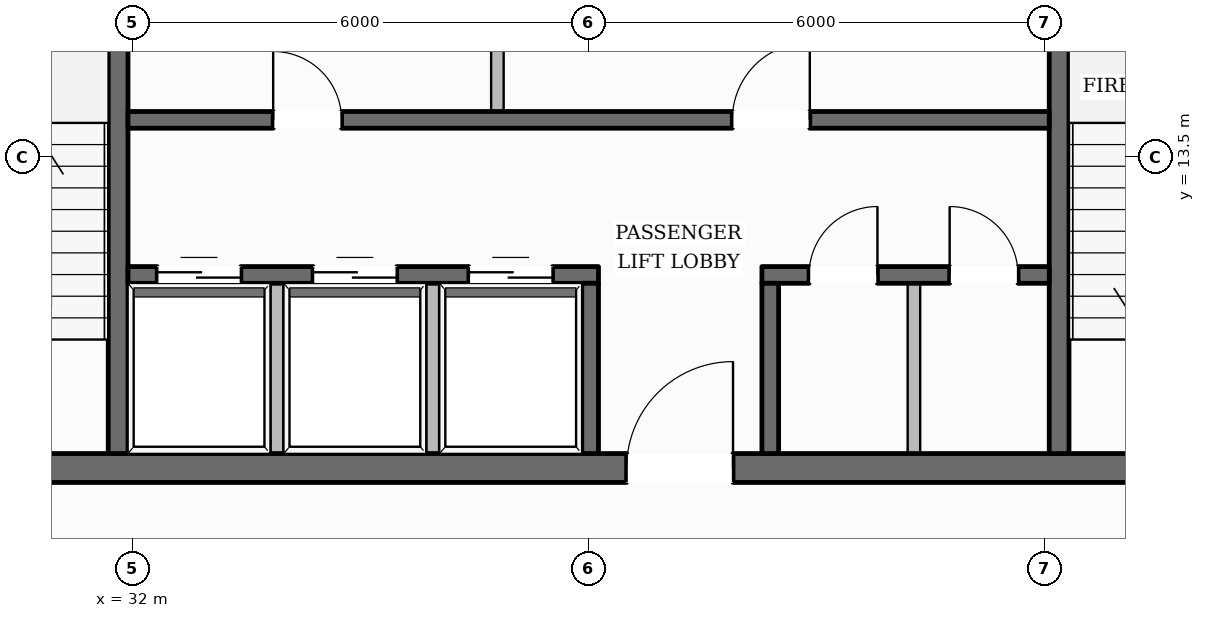
"""IFC4 building model, lengths in metres.
Left out: names, types, materials, properties, quantities, classifications, styles, units other than length and angle.
Written with IfcOpenShell. Run it as: python <this file> out.ifc"""

import sys

from ifc_helpers import new_model, si_unit, direction, frame, frame_2d, origin, place, context, subcontext, project, spatial, rectangle, extrude, element, fill, save


model = new_model("IFC4")
c1 = context("Model", 3, precision=1e-05, world=origin(), true_north=direction((0.0, 1.0)))
c2 = subcontext(c1, "Body", "Model", "MODEL_VIEW")
j1 = project(units=[si_unit("LENGTHUNIT", "METRE"), si_unit("PLANEANGLEUNIT", "RADIAN")], contexts=[c1])
p1 = place(None, origin())
s1 = spatial("IfcSite", under=j1, at=p1, CompositionType="ELEMENT")
p2 = place(p1, origin())
s2 = spatial("IfcBuilding", under=s1, at=p2, CompositionType="ELEMENT")
p3 = place(p2, frame((0.0, 0.0, 251.05)))
s3 = spatial("IfcBuildingStorey", under=s2, at=p3, CompositionType="ELEMENT", Elevation=251.05)
p4 = place(p3, frame((28.1, 9.41, 0.0), z_axis=(0.0, 0.0, 1.0), x_axis=(1.0, 0.0, 0.0)))
e1 = element("IfcWall", 1, at=p4, inside=s3, PredefinedType="SOLIDWALL", context=c2, shape_type="SweptSolid", body=[
    extrude(rectangle(XDim=19.8, YDim=0.38, at=frame_2d((9.9, 0.0))), origin(), (0.0, 0.0, 1.0), 3.61),
])
p5 = place(p4, frame((10.4, 0.0, 0.0)))
e2 = element("IfcOpeningElement", 2, at=p5, cuts=e1, PredefinedType="OPENING", context=c2, shape_type="SweptSolid", body=[
    extrude(rectangle(XDim=1.4, YDim=2.2, at=frame_2d((0.7, 1.1))), frame((0.0, 0.2, 0.0), z_axis=(0.0, -1.0, 0.0), x_axis=(1.0, 0.0, 0.0)), (0.0, 0.0, 1.0), 0.4),
])
p6 = place(p3, frame((31.81, 9.6, 0.0), z_axis=(0.0, 0.0, 1.0), x_axis=(0.0, 1.0, 0.0)))
e3 = element("IfcWall", 3, at=p6, inside=s3, PredefinedType="SHEAR", context=c2, shape_type="SweptSolid", body=[
    extrude(rectangle(XDim=13.0, YDim=0.26, at=frame_2d((6.5, 0.0))), origin(), (0.0, 0.0, 1.0), 3.61),
])
p7 = place(p6, frame((10.925, 0.0, 0.0)))
e4 = element("IfcOpeningElement", 4, at=p7, cuts=e3, PredefinedType="OPENING", context=c2, shape_type="SweptSolid", body=[
    extrude(rectangle(XDim=1.25, YDim=2.25, at=frame_2d((0.625, 1.125))), frame((0.0, 0.14, 0.0), z_axis=(0.0, -1.0, 0.0), x_axis=(1.0, 0.0, 0.0)), (0.0, 0.0, 1.0), 0.28),
])
p8 = place(p3, frame((44.19, 9.6, 0.0), z_axis=(0.0, 0.0, 1.0), x_axis=(0.0, 1.0, 0.0)))
e5 = element("IfcWall", 5, at=p8, inside=s3, PredefinedType="SHEAR", context=c2, shape_type="SweptSolid", body=[
    extrude(rectangle(XDim=13.0, YDim=0.26, at=frame_2d((6.5, 0.0))), origin(), (0.0, 0.0, 1.0), 3.61),
])
p9 = place(p8, frame((10.925, 0.0, 0.0)))
e6 = element("IfcOpeningElement", 6, at=p9, cuts=e5, PredefinedType="OPENING", context=c2, shape_type="SweptSolid", body=[
    extrude(rectangle(XDim=1.25, YDim=2.25, at=frame_2d((0.625, 1.125))), frame((0.0, 0.14, 0.0), z_axis=(0.0, -1.0, 0.0), x_axis=(1.0, 0.0, 0.0)), (0.0, 0.0, 1.0), 0.28),
])
p10 = place(p3, frame((31.94, 13.99, 0.0), z_axis=(0.0, 0.0, 1.0), x_axis=(1.0, 0.0, 0.0)))
e7 = element("IfcWall", 7, at=p10, inside=s3, PredefinedType="SOLIDWALL", context=c2, shape_type="SweptSolid", body=[
    extrude(rectangle(XDim=12.12, YDim=0.22, at=frame_2d((6.06, 0.0))), origin(), (0.0, 0.0, 1.0), 3.61),
])
p11 = place(p10, frame((1.91, 0.0, 0.0)))
e8 = element("IfcOpeningElement", 8, at=p11, cuts=e7, PredefinedType="OPENING", context=c2, shape_type="SweptSolid", body=[
    extrude(rectangle(XDim=0.9, YDim=2.1, at=frame_2d((0.45, 1.05))), frame((0.0, 0.12, 0.0), z_axis=(0.0, -1.0, 0.0), x_axis=(1.0, 0.0, 0.0)), (0.0, 0.0, 1.0), 0.24),
])
p12 = place(p10, frame((7.95, 0.0, 0.0)))
e9 = element("IfcOpeningElement", 9, at=p12, cuts=e7, PredefinedType="OPENING", context=c2, shape_type="SweptSolid", body=[
    extrude(rectangle(XDim=1.02, YDim=2.15, at=frame_2d((0.51, 1.075))), frame((0.0, 0.12, 0.0), z_axis=(0.0, -1.0, 0.0), x_axis=(1.0, 0.0, 0.0)), (0.0, 0.0, 1.0), 0.24),
])
p13 = place(p3, frame((31.94, 11.95, 0.0), z_axis=(0.0, 0.0, 1.0), x_axis=(1.0, 0.0, 0.0)))
e10 = element("IfcWall", 10, at=p13, inside=s3, PredefinedType="SOLIDWALL", context=c2, shape_type="SweptSolid", body=[
    extrude(rectangle(XDim=6.19, YDim=0.22, at=frame_2d((3.095, 0.0))), origin(), (0.0, 0.0, 1.0), 3.61),
])
p14 = place(p13, frame((0.385, 0.0, 0.0)))
e11 = element("IfcOpeningElement", 11, at=p14, cuts=e10, PredefinedType="OPENING", context=c2, shape_type="SweptSolid", body=[
    extrude(rectangle(XDim=1.1, YDim=2.2, at=frame_2d((0.55, 1.1))), frame((0.0, 0.12, 0.0), z_axis=(0.0, -1.0, 0.0), x_axis=(1.0, 0.0, 0.0)), (0.0, 0.0, 1.0), 0.24),
])
p15 = place(p13, frame((2.435, 0.0, 0.0)))
e12 = element("IfcOpeningElement", 12, at=p15, cuts=e10, PredefinedType="OPENING", context=c2, shape_type="SweptSolid", body=[
    extrude(rectangle(XDim=1.1, YDim=2.2, at=frame_2d((0.55, 1.1))), frame((0.0, 0.12, 0.0), z_axis=(0.0, -1.0, 0.0), x_axis=(1.0, 0.0, 0.0)), (0.0, 0.0, 1.0), 0.24),
])
p16 = place(p13, frame((4.485, 0.0, 0.0)))
e13 = element("IfcOpeningElement", 13, at=p16, cuts=e10, PredefinedType="OPENING", context=c2, shape_type="SweptSolid", body=[
    extrude(rectangle(XDim=1.1, YDim=2.2, at=frame_2d((0.55, 1.1))), frame((0.0, 0.12, 0.0), z_axis=(0.0, -1.0, 0.0), x_axis=(1.0, 0.0, 0.0)), (0.0, 0.0, 1.0), 0.24),
])
p17 = place(p3, frame((40.28, 11.95, 0.0), z_axis=(0.0, 0.0, 1.0), x_axis=(1.0, 0.0, 0.0)))
e14 = element("IfcWall", 14, at=p17, inside=s3, PredefinedType="SOLIDWALL", context=c2, shape_type="SweptSolid", body=[
    extrude(rectangle(XDim=3.78, YDim=0.22, at=frame_2d((1.89, 0.0))), origin(), (0.0, 0.0, 1.0), 3.61),
])
p18 = place(p17, frame((0.62, 0.0, 0.0)))
e15 = element("IfcOpeningElement", 15, at=p18, cuts=e14, PredefinedType="OPENING", context=c2, shape_type="SweptSolid", body=[
    extrude(rectangle(XDim=0.9, YDim=2.1, at=frame_2d((0.45, 1.05))), frame((0.0, 0.12, 0.0), z_axis=(0.0, -1.0, 0.0), x_axis=(1.0, 0.0, 0.0)), (0.0, 0.0, 1.0), 0.24),
])
p19 = place(p17, frame((2.47, 0.0, 0.0)))
e16 = element("IfcOpeningElement", 16, at=p19, cuts=e14, PredefinedType="OPENING", context=c2, shape_type="SweptSolid", body=[
    extrude(rectangle(XDim=0.9, YDim=2.1, at=frame_2d((0.45, 1.05))), frame((0.0, 0.12, 0.0), z_axis=(0.0, -1.0, 0.0), x_axis=(1.0, 0.0, 0.0)), (0.0, 0.0, 1.0), 0.24),
])
for number, where, z_axis, x_axis in (
    (17, (38.02, 9.6, 0.0), (0.0, 0.0, 1.0), (0.0, 1.0, 0.0)),
    (18, (40.39, 9.6, 0.0), (0.0, 0.0, 1.0), (0.0, 1.0, 0.0)),
):
    element("IfcWall", number, at=place(p3, frame(where, z_axis=z_axis, x_axis=x_axis)), inside=s3, PredefinedType="SOLIDWALL", context=c2, shape_type="SweptSolid", body=[
        extrude(rectangle(XDim=2.24, YDim=0.22, at=frame_2d((1.12, 0.0))), origin(), (0.0, 0.0, 1.0), 3.61),
    ])
p20 = place(p3, frame((16.214, 11.135, 0.0), z_axis=(0.0, 0.0, 1.0), x_axis=(0.49510347201, 0.868834018673, 0.0)))
e19 = element("IfcWall", 19, at=p20, inside=s3, PredefinedType="STANDARD", context=c2, shape_type="SweptSolid", body=[
    extrude(rectangle(XDim=37.643, YDim=0.35, at=frame_2d((18.822, 0.0))), origin(), (0.0, 0.0, 1.0), 3.196),
])
p21 = place(p20, frame((33.429, 0.0, 0.65)))
e20 = element("IfcOpeningElement", 20, at=p21, cuts=e19, PredefinedType="OPENING", context=c2, shape_type="SweptSolid", body=[
    extrude(rectangle(XDim=1.35, YDim=1.75, at=frame_2d((0.675, 0.875))), frame((0.0, 0.185, 0.0), z_axis=(0.0, -1.0, 0.0), x_axis=(1.0, 0.0, 0.0)), (0.0, 0.0, 1.0), 0.37),
])
p22 = place(p20, frame((27.315, 0.0, 0.65)))
e21 = element("IfcOpeningElement", 21, at=p22, cuts=e19, PredefinedType="OPENING", context=c2, shape_type="SweptSolid", body=[
    extrude(rectangle(XDim=1.35, YDim=1.75, at=frame_2d((0.675, 0.875))), frame((0.0, 0.185, 0.0), z_axis=(0.0, -1.0, 0.0), x_axis=(1.0, 0.0, 0.0)), (0.0, 0.0, 1.0), 0.37),
])
p23 = place(p20, frame((15.087, 0.0, 0.65)))
e22 = element("IfcOpeningElement", 22, at=p23, cuts=e19, PredefinedType="OPENING", context=c2, shape_type="SweptSolid", body=[
    extrude(rectangle(XDim=1.35, YDim=1.75, at=frame_2d((0.675, 0.875))), frame((0.0, 0.185, 0.0), z_axis=(0.0, -1.0, 0.0), x_axis=(1.0, 0.0, 0.0)), (0.0, 0.0, 1.0), 0.37),
])
p24 = place(p20, frame((8.973, 0.0, 0.65)))
e23 = element("IfcOpeningElement", 23, at=p24, cuts=e19, PredefinedType="OPENING", context=c2, shape_type="SweptSolid", body=[
    extrude(rectangle(XDim=1.35, YDim=1.75, at=frame_2d((0.675, 0.875))), frame((0.0, 0.185, 0.0), z_axis=(0.0, -1.0, 0.0), x_axis=(1.0, 0.0, 0.0)), (0.0, 0.0, 1.0), 0.37),
])
p25 = place(p20, frame((2.859, 0.0, 0.65)))
e24 = element("IfcOpeningElement", 24, at=p25, cuts=e19, PredefinedType="OPENING", context=c2, shape_type="SweptSolid", body=[
    extrude(rectangle(XDim=1.35, YDim=1.75, at=frame_2d((0.675, 0.875))), frame((0.0, 0.185, 0.0), z_axis=(0.0, -1.0, 0.0), x_axis=(1.0, 0.0, 0.0)), (0.0, 0.0, 1.0), 0.37),
])
p26 = place(p3, frame((41.284, 43.76, 0.0), z_axis=(0.0, 0.0, 1.0), x_axis=(0.50479404613, -0.863239810824, 0.0)))
e25 = element("IfcWall", 25, at=p26, inside=s3, PredefinedType="STANDARD", context=c2, shape_type="SweptSolid", body=[
    extrude(rectangle(XDim=38.372, YDim=0.35, at=frame_2d((19.186, 0.0))), origin(), (0.0, 0.0, 1.0), 3.196),
])
p27 = place(p26, frame((34.102, 0.0, 0.65)))
e26 = element("IfcOpeningElement", 26, at=p27, cuts=e25, PredefinedType="OPENING", context=c2, shape_type="SweptSolid", body=[
    extrude(rectangle(XDim=1.35, YDim=1.75, at=frame_2d((0.675, 0.875))), frame((0.0, 0.185, 0.0), z_axis=(0.0, -1.0, 0.0), x_axis=(1.0, 0.0, 0.0)), (0.0, 0.0, 1.0), 0.37),
])
p28 = place(p26, frame((27.864, 0.0, 0.65)))
e27 = element("IfcOpeningElement", 27, at=p28, cuts=e25, PredefinedType="OPENING", context=c2, shape_type="SweptSolid", body=[
    extrude(rectangle(XDim=1.35, YDim=1.75, at=frame_2d((0.675, 0.875))), frame((0.0, 0.185, 0.0), z_axis=(0.0, -1.0, 0.0), x_axis=(1.0, 0.0, 0.0)), (0.0, 0.0, 1.0), 0.37),
])
p29 = place(p26, frame((15.39, 0.0, 0.65)))
e28 = element("IfcOpeningElement", 28, at=p29, cuts=e25, PredefinedType="OPENING", context=c2, shape_type="SweptSolid", body=[
    extrude(rectangle(XDim=1.35, YDim=1.75, at=frame_2d((0.675, 0.875))), frame((0.0, 0.185, 0.0), z_axis=(0.0, -1.0, 0.0), x_axis=(1.0, 0.0, 0.0)), (0.0, 0.0, 1.0), 0.37),
])
p30 = place(p26, frame((9.153, 0.0, 0.65)))
e29 = element("IfcOpeningElement", 29, at=p30, cuts=e25, PredefinedType="OPENING", context=c2, shape_type="SweptSolid", body=[
    extrude(rectangle(XDim=1.35, YDim=1.75, at=frame_2d((0.675, 0.875))), frame((0.0, 0.185, 0.0), z_axis=(0.0, -1.0, 0.0), x_axis=(1.0, 0.0, 0.0)), (0.0, 0.0, 1.0), 0.37),
])
p31 = place(p26, frame((2.915, 0.0, 0.65)))
e30 = element("IfcOpeningElement", 30, at=p31, cuts=e25, PredefinedType="OPENING", context=c2, shape_type="SweptSolid", body=[
    extrude(rectangle(XDim=1.35, YDim=1.75, at=frame_2d((0.675, 0.875))), frame((0.0, 0.185, 0.0), z_axis=(0.0, -1.0, 0.0), x_axis=(1.0, 0.0, 0.0)), (0.0, 0.0, 1.0), 0.37),
])
for number, where, z_axis, x_axis in (
    (31, (33.9, 9.49, 0.0), (0.0, 0.0, 1.0), (0.0, 1.0, 0.0)),
    (32, (35.95, 9.49, 0.0), (0.0, 0.0, 1.0), (0.0, 1.0, 0.0)),
):
    element("IfcWall", number, at=place(p3, frame(where, z_axis=z_axis, x_axis=x_axis)), inside=s3, PredefinedType="PARTITIONING", context=c2, shape_type="SweptSolid", body=[
        extrude(rectangle(XDim=2.35, YDim=0.165, at=frame_2d((1.175, 0.0))), origin(), (0.0, 0.0, 1.0), 3.61),
    ])
p32 = place(p3, frame((36.8, 14.1, 0.0), z_axis=(0.0, 0.0, 1.0), x_axis=(0.0, 1.0, 0.0)))
e33 = element("IfcWall", 33, at=p32, inside=s3, PredefinedType="PARTITIONING", context=c2, shape_type="SweptSolid", body=[
    extrude(rectangle(XDim=2.24, YDim=0.165, at=frame_2d((1.12, 0.0))), origin(), (0.0, 0.0, 1.0), 3.61),
])
p33 = place(p3, frame((42.28, 9.49, 0.0), z_axis=(0.0, 0.0, 1.0), x_axis=(0.0, 1.0, 0.0)))
e34 = element("IfcWall", 34, at=p33, inside=s3, PredefinedType="PARTITIONING", context=c2, shape_type="SweptSolid", body=[
    extrude(rectangle(XDim=2.35, YDim=0.165, at=frame_2d((1.175, 0.0))), origin(), (0.0, 0.0, 1.0), 3.61),
])
p34 = place(p5, origin())
e35 = element("IfcDoor", 35, at=p34, inside=s3, OperationType="SINGLE_SWING_RIGHT", PredefinedType="DOOR", context=c2, shape_type="SweptSolid", body=[
    extrude(rectangle(XDim=1.4, YDim=2.2, at=frame_2d((0.7, 1.1))), frame((0.0, 0.025, 0.0), z_axis=(0.0, -1.0, 0.0), x_axis=(1.0, 0.0, 0.0)), (0.0, 0.0, 1.0), 0.05),
])
fill(e2, e35)
p35 = place(p14, origin())
e36 = element("IfcDoor", 36, at=p35, inside=s3, OperationType="DOUBLE_DOOR_SLIDING", PredefinedType="DOOR", context=c2, shape_type="SweptSolid", body=[
    extrude(rectangle(XDim=1.1, YDim=2.2, at=frame_2d((0.55, 1.1))), frame((0.0, 0.025, 0.0), z_axis=(0.0, -1.0, 0.0), x_axis=(1.0, 0.0, 0.0)), (0.0, 0.0, 1.0), 0.05),
])
fill(e11, e36)
p36 = place(p15, origin())
e37 = element("IfcDoor", 37, at=p36, inside=s3, OperationType="DOUBLE_DOOR_SLIDING", PredefinedType="DOOR", context=c2, shape_type="SweptSolid", body=[
    extrude(rectangle(XDim=1.1, YDim=2.2, at=frame_2d((0.55, 1.1))), frame((0.0, 0.025, 0.0), z_axis=(0.0, -1.0, 0.0), x_axis=(1.0, 0.0, 0.0)), (0.0, 0.0, 1.0), 0.05),
])
fill(e12, e37)
p37 = place(p16, origin())
e38 = element("IfcDoor", 38, at=p37, inside=s3, OperationType="DOUBLE_DOOR_SLIDING", PredefinedType="DOOR", context=c2, shape_type="SweptSolid", body=[
    extrude(rectangle(XDim=1.1, YDim=2.2, at=frame_2d((0.55, 1.1))), frame((0.0, 0.025, 0.0), z_axis=(0.0, -1.0, 0.0), x_axis=(1.0, 0.0, 0.0)), (0.0, 0.0, 1.0), 0.05),
])
fill(e13, e38)
p38 = place(p11, origin())
e39 = element("IfcDoor", 39, at=p38, inside=s3, OperationType="SINGLE_SWING_LEFT", PredefinedType="DOOR", context=c2, shape_type="SweptSolid", body=[
    extrude(rectangle(XDim=0.9, YDim=2.1, at=frame_2d((0.45, 1.05))), frame((0.0, 0.025, 0.0), z_axis=(0.0, -1.0, 0.0), x_axis=(1.0, 0.0, 0.0)), (0.0, 0.0, 1.0), 0.05),
])
fill(e8, e39)
p39 = place(p12, origin())
e40 = element("IfcDoor", 40, at=p39, inside=s3, OperationType="SINGLE_SWING_RIGHT", PredefinedType="DOOR", context=c2, shape_type="SweptSolid", body=[
    extrude(rectangle(XDim=1.02, YDim=2.15, at=frame_2d((0.51, 1.075))), frame((0.0, 0.025, 0.0), z_axis=(0.0, -1.0, 0.0), x_axis=(1.0, 0.0, 0.0)), (0.0, 0.0, 1.0), 0.05),
])
fill(e9, e40)
p40 = place(p18, origin())
e41 = element("IfcDoor", 41, at=p40, inside=s3, OperationType="SINGLE_SWING_RIGHT", PredefinedType="DOOR", context=c2, shape_type="SweptSolid", body=[
    extrude(rectangle(XDim=0.9, YDim=2.1, at=frame_2d((0.45, 1.05))), frame((0.0, 0.025, 0.0), z_axis=(0.0, -1.0, 0.0), x_axis=(1.0, 0.0, 0.0)), (0.0, 0.0, 1.0), 0.05),
])
fill(e15, e41)
p41 = place(p19, origin())
e42 = element("IfcDoor", 42, at=p41, inside=s3, OperationType="SINGLE_SWING_LEFT", PredefinedType="DOOR", context=c2, shape_type="SweptSolid", body=[
    extrude(rectangle(XDim=0.9, YDim=2.1, at=frame_2d((0.45, 1.05))), frame((0.0, 0.025, 0.0), z_axis=(0.0, -1.0, 0.0), x_axis=(1.0, 0.0, 0.0)), (0.0, 0.0, 1.0), 0.05),
])
fill(e16, e42)
save(model, sys.argv[1])
